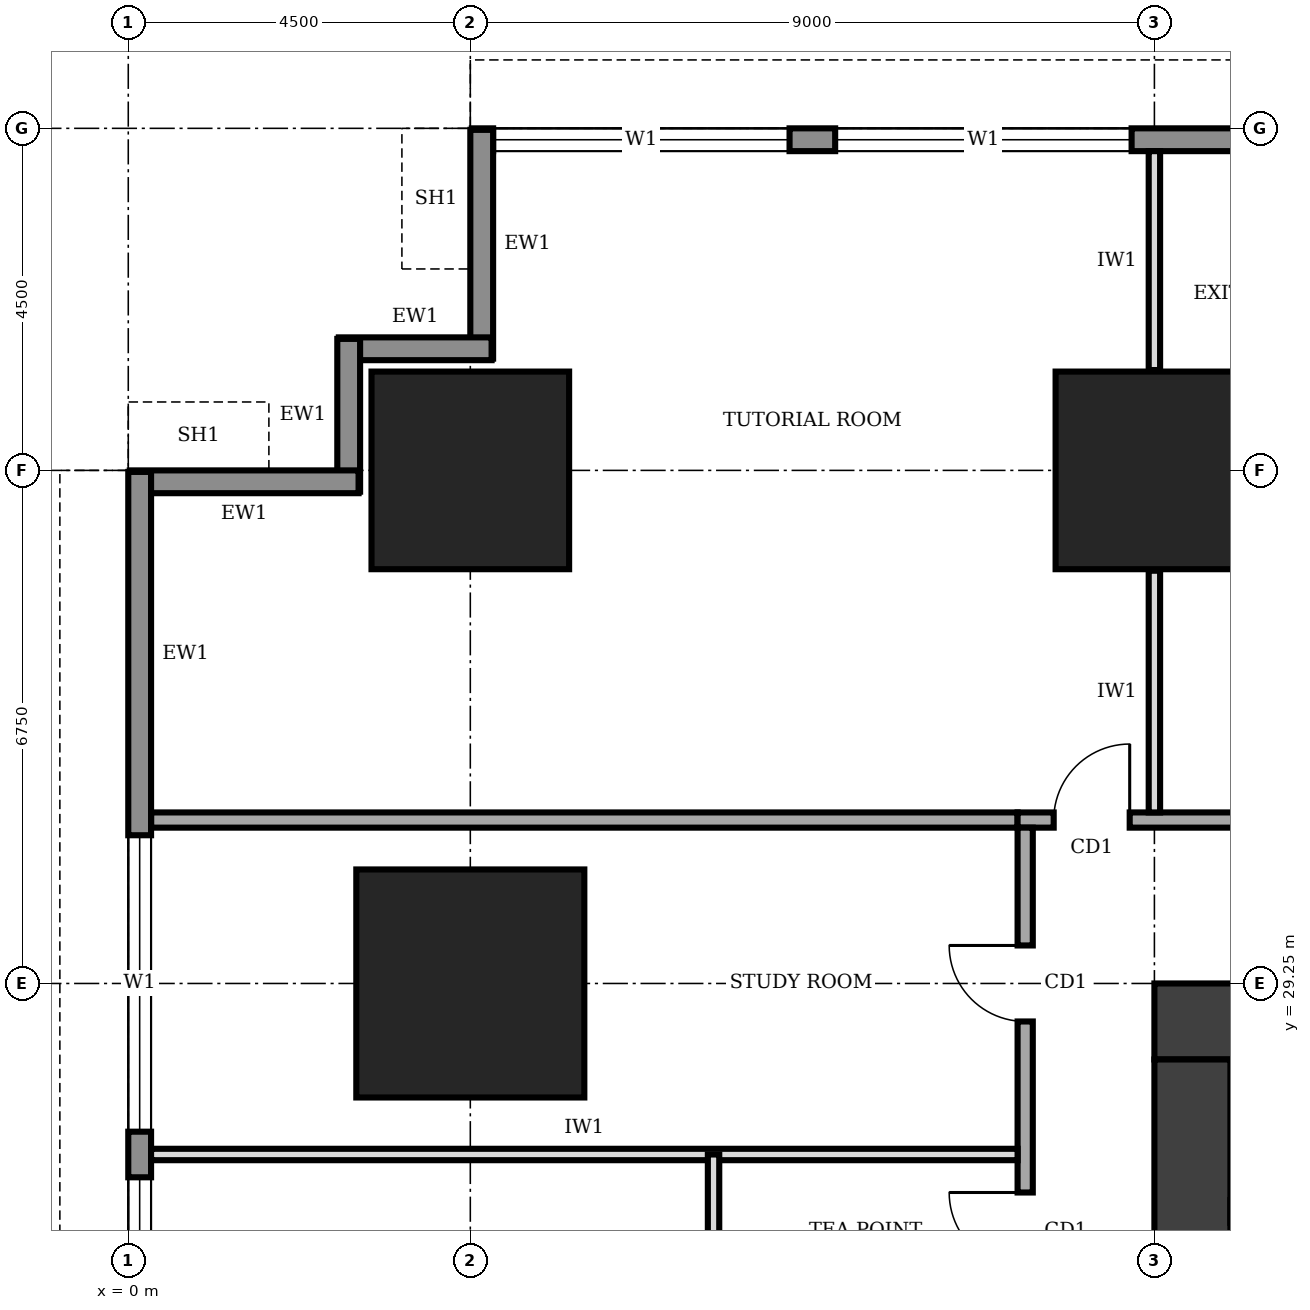
"""IFC4 building model, lengths in metres.
Left out: names, types, materials, properties, quantities, classifications, styles, units other than length and angle.
Written with IfcOpenShell. Run it as: python <this file> out.ifc"""

import sys

from ifc_helpers import new_model, si_unit, direction, frame, frame_2d, origin, origin_2d, place, context, subcontext, project, spatial, rectangle, extrude, element, fill, save


model = new_model("IFC4")
c1 = context("Model", 3, precision=1e-05, world=origin(), true_north=direction((0.0, 1.0)))
c2 = subcontext(c1, "Body", "Model", "MODEL_VIEW")
j1 = project(units=[si_unit("LENGTHUNIT", "METRE"), si_unit("PLANEANGLEUNIT", "RADIAN")], contexts=[c1])
p1 = place(None, origin())
s1 = spatial("IfcSite", under=j1, at=p1, CompositionType="ELEMENT")
p2 = place(p1, origin())
s2 = spatial("IfcBuilding", under=s1, at=p2, CompositionType="ELEMENT")
p3 = place(p2, frame((0.0, 0.0, 45.0)))
s3 = spatial("IfcBuildingStorey", under=s2, at=p3, CompositionType="ELEMENT", Elevation=45.0)
p4 = place(p3, frame((27.0, 28.75, 0.0), z_axis=(0.0, 0.0, 1.0), x_axis=(-1.0, 0.0, 0.0)))
e1 = element("IfcWall", 1, at=p4, inside=s3, PredefinedType="SHEAR", context=c2, shape_type="SweptSolid", body=[
    extrude(rectangle(XDim=13.5, YDim=1.0, at=frame_2d((6.75, 0.0))), origin(), (0.0, 0.0, 1.0), 4.0),
])
p5 = place(p4, frame((4.75, 0.0, 0.0)))
e2 = element("IfcOpeningElement", 2, at=p5, cuts=e1, PredefinedType="OPENING", context=c2, shape_type="SweptSolid", body=[
    extrude(rectangle(XDim=1.8, YDim=2.1, at=frame_2d((0.9, 1.05))), frame((0.0, 0.51, 0.0), z_axis=(0.0, -1.0, 0.0), x_axis=(1.0, 0.0, 0.0)), (0.0, 0.0, 1.0), 1.02),
])
p6 = place(p3, frame((14.0, 28.25, 0.0), z_axis=(0.0, 0.0, 1.0), x_axis=(0.0, -1.0, 0.0)))
e3 = element("IfcWall", 3, at=p6, inside=s3, PredefinedType="SHEAR", context=c2, shape_type="SweptSolid", body=[
    extrude(rectangle(XDim=16.0, YDim=1.0, at=frame_2d((8.0, 0.0))), origin(), (0.0, 0.0, 1.0), 4.0),
])
p7 = place(p3, frame((4.5, 29.25, 0.0), z_axis=(0.0, 0.0, 1.0), x_axis=(1.0, 0.0, 0.0)))
e4 = element("IfcColumn", 4, at=p7, inside=s3, PredefinedType="COLUMN", context=c2, shape_type="SweptSolid", body=[
    extrude(rectangle(XDim=3.0, YDim=3.0, at=origin_2d()), origin(), (0.0, 0.0, 1.0), 4.0),
])
for number, where, z_axis, x_axis in (
    (5, (4.5, 36.0, 0.0), (0.0, 0.0, 1.0), (1.0, 0.0, 0.0)),
    (6, (13.5, 36.0, 0.0), (0.0, 0.0, 1.0), (1.0, 0.0, 0.0)),
):
    element("IfcColumn", number, at=place(p3, frame(where, z_axis=z_axis, x_axis=x_axis)), inside=s3, PredefinedType="COLUMN", context=c2, shape_type="SweptSolid", body=[
        extrude(rectangle(XDim=2.6, YDim=2.6, at=origin_2d()), origin(), (0.0, 0.0, 1.0), 4.0),
    ])
p8 = place(p3, frame((35.98, 40.35, 0.0), z_axis=(0.0, 0.0, 1.0), x_axis=(-1.0, 0.0, 0.0)))
e7 = element("IfcWall", 7, at=p8, inside=s3, PredefinedType="STANDARD", context=c2, shape_type="SweptSolid", body=[
    extrude(rectangle(XDim=31.46, YDim=0.3, at=frame_2d((15.73, 0.0))), origin(), (0.0, 0.0, 1.0), 3.75),
])
p9 = place(p8, frame((27.28, 0.0, 0.9)))
e8 = element("IfcOpeningElement", 8, at=p9, cuts=e7, PredefinedType="OPENING", context=c2, shape_type="SweptSolid", body=[
    extrude(rectangle(XDim=3.9, YDim=2.2, at=frame_2d((1.95, 1.1))), frame((0.0, 0.16, 0.0), z_axis=(0.0, -1.0, 0.0), x_axis=(1.0, 0.0, 0.0)), (0.0, 0.0, 1.0), 0.32),
])
p10 = place(p8, frame((22.78, 0.0, 0.9)))
e9 = element("IfcOpeningElement", 9, at=p10, cuts=e7, PredefinedType="OPENING", context=c2, shape_type="SweptSolid", body=[
    extrude(rectangle(XDim=3.9, YDim=2.2, at=frame_2d((1.95, 1.1))), frame((0.0, 0.16, 0.0), z_axis=(0.0, -1.0, 0.0), x_axis=(1.0, 0.0, 0.0)), (0.0, 0.0, 1.0), 0.32),
])
p11 = place(p8, frame((4.78, 0.0, 0.9)))
e10 = element("IfcOpeningElement", 10, at=p11, cuts=e7, PredefinedType="OPENING", context=c2, shape_type="SweptSolid", body=[
    extrude(rectangle(XDim=3.9, YDim=2.2, at=frame_2d((1.95, 1.1))), frame((0.0, 0.16, 0.0), z_axis=(0.0, -1.0, 0.0), x_axis=(1.0, 0.0, 0.0)), (0.0, 0.0, 1.0), 0.32),
])
p12 = place(p3, frame((4.65, 40.48, 0.0), z_axis=(0.0, 0.0, 1.0), x_axis=(0.0, -1.0, 0.0)))
e11 = element("IfcWall", 11, at=p12, inside=s3, PredefinedType="STANDARD", context=c2, shape_type="SweptSolid", body=[
    extrude(rectangle(XDim=3.01, YDim=0.3, at=frame_2d((1.505, 0.0))), origin(), (0.0, 0.0, 1.0), 2.85),
])
for number, where, z_axis, x_axis in (
    (12, (4.78, 37.6, 0.0), (0.0, 0.0, 1.0), (-1.0, 0.0, 0.0)),
    (13, (2.9, 37.73, 0.0), (0.0, 0.0, 1.0), (0.0, -1.0, 0.0)),
):
    element("IfcWall", number, at=place(p3, frame(where, z_axis=z_axis, x_axis=x_axis)), inside=s3, PredefinedType="STANDARD", context=c2, shape_type="SweptSolid", body=[
        extrude(rectangle(XDim=2.01, YDim=0.3, at=frame_2d((1.005, 0.0))), origin(), (0.0, 0.0, 1.0), 3.75),
    ])
p13 = place(p3, frame((3.03, 35.85, 0.0), z_axis=(0.0, 0.0, 1.0), x_axis=(-1.0, 0.0, 0.0)))
e14 = element("IfcWall", 14, at=p13, inside=s3, PredefinedType="STANDARD", context=c2, shape_type="SweptSolid", body=[
    extrude(rectangle(XDim=3.01, YDim=0.3, at=frame_2d((1.505, 0.0))), origin(), (0.0, 0.0, 1.0), 2.85),
])
p14 = place(p3, frame((0.15, 35.98, 0.0), z_axis=(0.0, 0.0, 1.0), x_axis=(0.0, -1.0, 0.0)))
e15 = element("IfcWall", 15, at=p14, inside=s3, PredefinedType="STANDARD", context=c2, shape_type="SweptSolid", body=[
    extrude(rectangle(XDim=31.46, YDim=0.3, at=frame_2d((15.73, 0.0))), origin(), (0.0, 0.0, 1.0), 3.75),
])
p15 = place(p14, frame((27.28, 0.0, 0.9)))
e16 = element("IfcOpeningElement", 16, at=p15, cuts=e15, PredefinedType="OPENING", context=c2, shape_type="SweptSolid", body=[
    extrude(rectangle(XDim=3.9, YDim=2.2, at=frame_2d((1.95, 1.1))), frame((0.0, 0.16, 0.0), z_axis=(0.0, -1.0, 0.0), x_axis=(1.0, 0.0, 0.0)), (0.0, 0.0, 1.0), 0.32),
])
p16 = place(p14, frame((22.78, 0.0, 0.9)))
e17 = element("IfcOpeningElement", 17, at=p16, cuts=e15, PredefinedType="OPENING", context=c2, shape_type="SweptSolid", body=[
    extrude(rectangle(XDim=3.9, YDim=2.2, at=frame_2d((1.95, 1.1))), frame((0.0, 0.16, 0.0), z_axis=(0.0, -1.0, 0.0), x_axis=(1.0, 0.0, 0.0)), (0.0, 0.0, 1.0), 0.32),
])
p17 = place(p14, frame((18.28, 0.0, 0.9)))
e18 = element("IfcOpeningElement", 18, at=p17, cuts=e15, PredefinedType="OPENING", context=c2, shape_type="SweptSolid", body=[
    extrude(rectangle(XDim=3.9, YDim=2.2, at=frame_2d((1.95, 1.1))), frame((0.0, 0.16, 0.0), z_axis=(0.0, -1.0, 0.0), x_axis=(1.0, 0.0, 0.0)), (0.0, 0.0, 1.0), 0.32),
])
p18 = place(p14, frame((13.78, 0.0, 0.9)))
e19 = element("IfcOpeningElement", 19, at=p18, cuts=e15, PredefinedType="OPENING", context=c2, shape_type="SweptSolid", body=[
    extrude(rectangle(XDim=3.9, YDim=2.2, at=frame_2d((1.95, 1.1))), frame((0.0, 0.16, 0.0), z_axis=(0.0, -1.0, 0.0), x_axis=(1.0, 0.0, 0.0)), (0.0, 0.0, 1.0), 0.32),
])
p19 = place(p14, frame((9.28, 0.0, 0.9)))
e20 = element("IfcOpeningElement", 20, at=p19, cuts=e15, PredefinedType="OPENING", context=c2, shape_type="SweptSolid", body=[
    extrude(rectangle(XDim=3.9, YDim=2.2, at=frame_2d((1.95, 1.1))), frame((0.0, 0.16, 0.0), z_axis=(0.0, -1.0, 0.0), x_axis=(1.0, 0.0, 0.0)), (0.0, 0.0, 1.0), 0.32),
])
p20 = place(p14, frame((4.78, 0.0, 0.9)))
e21 = element("IfcOpeningElement", 21, at=p20, cuts=e15, PredefinedType="OPENING", context=c2, shape_type="SweptSolid", body=[
    extrude(rectangle(XDim=3.9, YDim=2.2, at=frame_2d((1.95, 1.1))), frame((0.0, 0.16, 0.0), z_axis=(0.0, -1.0, 0.0), x_axis=(1.0, 0.0, 0.0)), (0.0, 0.0, 1.0), 0.32),
])
p21 = place(p3, frame((30.1, 31.4, 0.0), z_axis=(0.0, 0.0, 1.0), x_axis=(-1.0, 0.0, 0.0)))
e22 = element("IfcWall", 22, at=p21, inside=s3, PredefinedType="SOLIDWALL", context=c2, shape_type="SweptSolid", body=[
    extrude(rectangle(XDim=18.4, YDim=0.2, at=frame_2d((9.2, 0.0))), origin(), (0.0, 0.0, 1.0), 3.75),
])
p22 = place(p21, frame((16.925, 0.0, 0.0)))
e23 = element("IfcOpeningElement", 23, at=p22, cuts=e22, PredefinedType="OPENING", context=c2, shape_type="SweptSolid", body=[
    extrude(rectangle(XDim=1.0, YDim=2.1, at=frame_2d((0.5, 1.05))), frame((0.0, 0.11, 0.0), z_axis=(0.0, -1.0, 0.0), x_axis=(1.0, 0.0, 0.0)), (0.0, 0.0, 1.0), 0.22),
])
p23 = place(p21, frame((13.85, 0.0, 0.0)))
e24 = element("IfcOpeningElement", 24, at=p23, cuts=e22, PredefinedType="OPENING", context=c2, shape_type="SweptSolid", body=[
    extrude(rectangle(XDim=1.0, YDim=2.1, at=frame_2d((0.5, 1.05))), frame((0.0, 0.11, 0.0), z_axis=(0.0, -1.0, 0.0), x_axis=(1.0, 0.0, 0.0)), (0.0, 0.0, 1.0), 0.22),
])
p24 = place(p21, frame((7.1, 0.0, 0.0)))
e25 = element("IfcOpeningElement", 25, at=p24, cuts=e22, PredefinedType="OPENING", context=c2, shape_type="SweptSolid", body=[
    extrude(rectangle(XDim=1.0, YDim=2.1, at=frame_2d((0.5, 1.05))), frame((0.0, 0.11, 0.0), z_axis=(0.0, -1.0, 0.0), x_axis=(1.0, 0.0, 0.0)), (0.0, 0.0, 1.0), 0.22),
])
p25 = place(p21, frame((0.55, 0.0, 0.0)))
e26 = element("IfcOpeningElement", 26, at=p25, cuts=e22, PredefinedType="OPENING", context=c2, shape_type="SweptSolid", body=[
    extrude(rectangle(XDim=1.8, YDim=2.1, at=frame_2d((0.9, 1.05))), frame((0.0, 0.11, 0.0), z_axis=(0.0, -1.0, 0.0), x_axis=(1.0, 0.0, 0.0)), (0.0, 0.0, 1.0), 0.22),
])
p26 = place(p3, frame((11.8, 31.3, 0.0), z_axis=(0.0, 0.0, 1.0), x_axis=(0.0, -1.0, 0.0)))
e27 = element("IfcWall", 27, at=p26, inside=s3, PredefinedType="SOLIDWALL", context=c2, shape_type="SweptSolid", body=[
    extrude(rectangle(XDim=22.3, YDim=0.2, at=frame_2d((11.15, 0.0))), origin(), (0.0, 0.0, 1.0), 3.75),
])
p27 = place(p26, frame((19.55, 0.0, 0.0)))
e28 = element("IfcOpeningElement", 28, at=p27, cuts=e27, PredefinedType="OPENING", context=c2, shape_type="SweptSolid", body=[
    extrude(rectangle(XDim=1.0, YDim=2.1, at=frame_2d((0.5, 1.05))), frame((0.0, 0.11, 0.0), z_axis=(0.0, -1.0, 0.0), x_axis=(1.0, 0.0, 0.0)), (0.0, 0.0, 1.0), 0.22),
])
p28 = place(p26, frame((16.15, 0.0, 0.0)))
e29 = element("IfcOpeningElement", 29, at=p28, cuts=e27, PredefinedType="OPENING", context=c2, shape_type="SweptSolid", body=[
    extrude(rectangle(XDim=0.9, YDim=2.1, at=frame_2d((0.45, 1.05))), frame((0.0, 0.11, 0.0), z_axis=(0.0, -1.0, 0.0), x_axis=(1.0, 0.0, 0.0)), (0.0, 0.0, 1.0), 0.22),
])
p29 = place(p26, frame((12.95, 0.0, 0.0)))
e30 = element("IfcOpeningElement", 30, at=p29, cuts=e27, PredefinedType="OPENING", context=c2, shape_type="SweptSolid", body=[
    extrude(rectangle(XDim=0.9, YDim=2.1, at=frame_2d((0.45, 1.05))), frame((0.0, 0.11, 0.0), z_axis=(0.0, -1.0, 0.0), x_axis=(1.0, 0.0, 0.0)), (0.0, 0.0, 1.0), 0.22),
])
p30 = place(p26, frame((7.4, 0.0, 0.0)))
e31 = element("IfcOpeningElement", 31, at=p30, cuts=e27, PredefinedType="OPENING", context=c2, shape_type="SweptSolid", body=[
    extrude(rectangle(XDim=0.9, YDim=2.1, at=frame_2d((0.45, 1.05))), frame((0.0, 0.11, 0.0), z_axis=(0.0, -1.0, 0.0), x_axis=(1.0, 0.0, 0.0)), (0.0, 0.0, 1.0), 0.22),
])
p31 = place(p26, frame((4.8, 0.0, 0.0)))
e32 = element("IfcOpeningElement", 32, at=p31, cuts=e27, PredefinedType="OPENING", context=c2, shape_type="SweptSolid", body=[
    extrude(rectangle(XDim=1.0, YDim=2.1, at=frame_2d((0.5, 1.05))), frame((0.0, 0.11, 0.0), z_axis=(0.0, -1.0, 0.0), x_axis=(1.0, 0.0, 0.0)), (0.0, 0.0, 1.0), 0.22),
])
p32 = place(p26, frame((9.9, 0.0, 0.0)))
e33 = element("IfcOpeningElement", 33, at=p32, cuts=e27, PredefinedType="OPENING", context=c2, shape_type="SweptSolid", body=[
    extrude(rectangle(XDim=1.0, YDim=2.1, at=frame_2d((0.5, 1.05))), frame((0.0, 0.11, 0.0), z_axis=(0.0, -1.0, 0.0), x_axis=(1.0, 0.0, 0.0)), (0.0, 0.0, 1.0), 0.22),
])
p33 = place(p26, frame((1.55, 0.0, 0.0)))
e34 = element("IfcOpeningElement", 34, at=p33, cuts=e27, PredefinedType="OPENING", context=c2, shape_type="SweptSolid", body=[
    extrude(rectangle(XDim=1.0, YDim=2.1, at=frame_2d((0.5, 1.05))), frame((0.0, 0.11, 0.0), z_axis=(0.0, -1.0, 0.0), x_axis=(1.0, 0.0, 0.0)), (0.0, 0.0, 1.0), 0.22),
])
p34 = place(p3, frame((0.3, 31.4, 0.0), z_axis=(0.0, 0.0, 1.0), x_axis=(1.0, 0.0, 0.0)))
e35 = element("IfcWall", 35, at=p34, inside=s3, PredefinedType="SOLIDWALL", context=c2, shape_type="SweptSolid", body=[
    extrude(rectangle(XDim=11.4, YDim=0.2, at=frame_2d((5.7, 0.0))), origin(), (0.0, 0.0, 1.0), 3.75),
])
p35 = place(p3, frame((13.5, 31.5, 0.0), z_axis=(0.0, 0.0, 1.0), x_axis=(0.0, 1.0, 0.0)))
e36 = element("IfcWall", 36, at=p35, inside=s3, PredefinedType="PARTITIONING", context=c2, shape_type="SweptSolid", body=[
    extrude(rectangle(XDim=3.18, YDim=0.15, at=frame_2d((1.59, 0.0))), origin(), (0.0, 0.0, 1.0), 2.85),
])
p36 = place(p3, frame((13.5, 37.32, 0.0), z_axis=(0.0, 0.0, 1.0), x_axis=(0.0, 1.0, 0.0)))
e37 = element("IfcWall", 37, at=p36, inside=s3, PredefinedType="PARTITIONING", context=c2, shape_type="SweptSolid", body=[
    extrude(rectangle(XDim=2.88, YDim=0.15, at=frame_2d((1.44, 0.0))), origin(), (0.0, 0.0, 1.0), 2.85),
])
p37 = place(p3, frame((0.3, 27.0, 0.0), z_axis=(0.0, 0.0, 1.0), x_axis=(1.0, 0.0, 0.0)))
e38 = element("IfcWall", 38, at=p37, inside=s3, PredefinedType="PARTITIONING", context=c2, shape_type="SweptSolid", body=[
    extrude(rectangle(XDim=11.4, YDim=0.15, at=frame_2d((5.7, 0.0))), origin(), (0.0, 0.0, 1.0), 3.75),
])
p38 = place(p3, frame((7.7, 25.0, 0.0), z_axis=(0.0, 0.0, 1.0), x_axis=(0.0, 1.0, 0.0)))
e39 = element("IfcWall", 39, at=p38, inside=s3, PredefinedType="PARTITIONING", context=c2, shape_type="SweptSolid", body=[
    extrude(rectangle(XDim=2.0, YDim=0.15, at=frame_2d((1.0, 0.0))), origin(), (0.0, 0.0, 1.0), 3.75),
])
p39 = place(p9, origin())
e40 = element("IfcWindow", 40, at=p39, inside=s3, PartitioningType="SINGLE_PANEL", PredefinedType="WINDOW", context=c2, shape_type="SweptSolid", body=[
    extrude(rectangle(XDim=3.9, YDim=2.2, at=frame_2d((1.95, 1.1))), frame((0.0, 0.03, 0.0), z_axis=(0.0, -1.0, 0.0), x_axis=(1.0, 0.0, 0.0)), (0.0, 0.0, 1.0), 0.06),
])
fill(e8, e40)
p40 = place(p10, origin())
e41 = element("IfcWindow", 41, at=p40, inside=s3, PartitioningType="SINGLE_PANEL", PredefinedType="WINDOW", context=c2, shape_type="SweptSolid", body=[
    extrude(rectangle(XDim=3.9, YDim=2.2, at=frame_2d((1.95, 1.1))), frame((0.0, 0.03, 0.0), z_axis=(0.0, -1.0, 0.0), x_axis=(1.0, 0.0, 0.0)), (0.0, 0.0, 1.0), 0.06),
])
fill(e9, e41)
p41 = place(p19, origin())
e42 = element("IfcWindow", 42, at=p41, inside=s3, PartitioningType="SINGLE_PANEL", PredefinedType="WINDOW", context=c2, shape_type="SweptSolid", body=[
    extrude(rectangle(XDim=3.9, YDim=2.2, at=frame_2d((1.95, 1.1))), frame((0.0, 0.03, 0.0), z_axis=(0.0, -1.0, 0.0), x_axis=(1.0, 0.0, 0.0)), (0.0, 0.0, 1.0), 0.06),
])
fill(e20, e42)
p42 = place(p20, origin())
e43 = element("IfcWindow", 43, at=p42, inside=s3, PartitioningType="SINGLE_PANEL", PredefinedType="WINDOW", context=c2, shape_type="SweptSolid", body=[
    extrude(rectangle(XDim=3.9, YDim=2.2, at=frame_2d((1.95, 1.1))), frame((0.0, 0.03, 0.0), z_axis=(0.0, -1.0, 0.0), x_axis=(1.0, 0.0, 0.0)), (0.0, 0.0, 1.0), 0.06),
])
fill(e21, e43)
p43 = place(p22, frame((1.0, 0.0, 0.0), z_axis=(0.0, 0.0, 1.0), x_axis=(-1.0, 0.0, 0.0)))
e44 = element("IfcDoor", 44, at=p43, inside=s3, OperationType="SINGLE_SWING_RIGHT", PredefinedType="DOOR", context=c2, shape_type="SweptSolid", body=[
    extrude(rectangle(XDim=1.0, YDim=2.1, at=frame_2d((0.5, 1.05))), frame((0.0, 0.025, 0.0), z_axis=(0.0, -1.0, 0.0), x_axis=(1.0, 0.0, 0.0)), (0.0, 0.0, 1.0), 0.05),
])
fill(e23, e44)
p44 = place(p31, frame((1.0, 0.0, 0.0), z_axis=(0.0, 0.0, 1.0), x_axis=(-1.0, 0.0, 0.0)))
e45 = element("IfcDoor", 45, at=p44, inside=s3, OperationType="SINGLE_SWING_RIGHT", PredefinedType="DOOR", context=c2, shape_type="SweptSolid", body=[
    extrude(rectangle(XDim=1.0, YDim=2.1, at=frame_2d((0.5, 1.05))), frame((0.0, 0.025, 0.0), z_axis=(0.0, -1.0, 0.0), x_axis=(1.0, 0.0, 0.0)), (0.0, 0.0, 1.0), 0.05),
])
fill(e32, e45)
p45 = place(p33, frame((1.0, 0.0, 0.0), z_axis=(0.0, 0.0, 1.0), x_axis=(-1.0, 0.0, 0.0)))
e46 = element("IfcDoor", 46, at=p45, inside=s3, OperationType="SINGLE_SWING_RIGHT", PredefinedType="DOOR", context=c2, shape_type="SweptSolid", body=[
    extrude(rectangle(XDim=1.0, YDim=2.1, at=frame_2d((0.5, 1.05))), frame((0.0, 0.025, 0.0), z_axis=(0.0, -1.0, 0.0), x_axis=(1.0, 0.0, 0.0)), (0.0, 0.0, 1.0), 0.05),
])
fill(e34, e46)
save(model, sys.argv[1])
